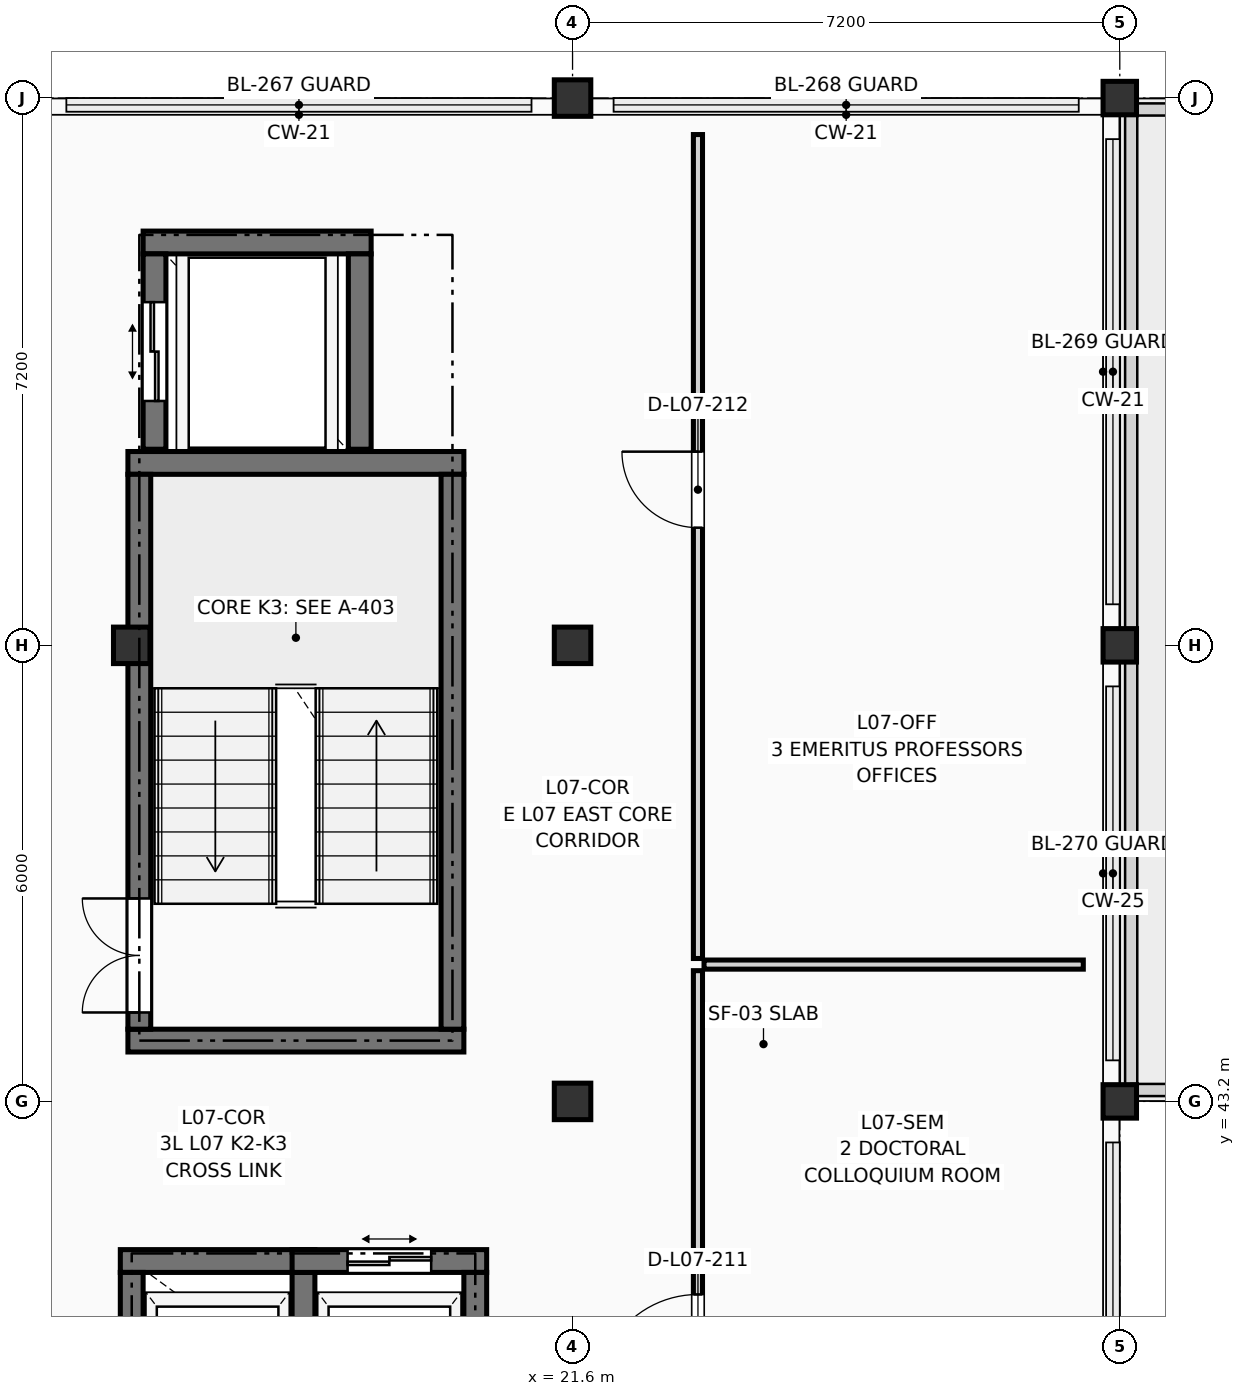
"""IFC4 building model, lengths in metres.
Left out: names, types, materials, properties, quantities, classifications, styles, units other than length and angle.
Written with IfcOpenShell. Run it as: python <this file> out.ifc"""

import sys

from ifc_helpers import new_model, si_unit, direction, frame, frame_2d, origin, origin_2d, place, context, subcontext, project, spatial, rectangle, extrude, element, fill, save


model = new_model("IFC4")
c1 = context("Model", 3, precision=1e-05, world=origin(), true_north=direction((0.0, 1.0)))
c2 = subcontext(c1, "Body", "Model", "MODEL_VIEW")
j1 = project(units=[si_unit("LENGTHUNIT", "METRE"), si_unit("PLANEANGLEUNIT", "RADIAN")], contexts=[c1])
p1 = place(None, origin())
s1 = spatial("IfcSite", under=j1, at=p1, CompositionType="ELEMENT")
p2 = place(p1, origin())
s2 = spatial("IfcBuilding", under=s1, at=p2, CompositionType="ELEMENT")
p3 = place(p2, frame((0.0, 0.0, 26.25)))
s3 = spatial("IfcBuildingStorey", under=s2, at=p3, CompositionType="ELEMENT", Elevation=26.25)
for number, where, z_axis, x_axis in (
    (1, (15.8, 49.2, 0.0), (0.0, 0.0, 1.0), (1.0, 0.0, 0.0)),
    (2, (21.6, 43.2, 0.0), (0.0, 0.0, 1.0), (1.0, 0.0, 0.0)),
    (3, (21.6, 49.2, 0.0), (0.0, 0.0, 1.0), (1.0, 0.0, 0.0)),
    (4, (21.6, 56.4, 0.0), (0.0, 0.0, 1.0), (1.0, 0.0, 0.0)),
):
    element("IfcColumn", number, at=place(p3, frame(where, z_axis=z_axis, x_axis=x_axis)), inside=s3, PredefinedType="COLUMN", context=c2, shape_type="SweptSolid", body=[
        extrude(rectangle(XDim=0.48, YDim=0.48, at=origin_2d()), origin(), (0.0, 0.0, 1.0), 3.45),
    ])
for number, where, z_axis, x_axis in (
    (5, (28.8, 43.2, 0.0), (0.0, 0.0, 1.0), (1.0, 0.0, 0.0)),
    (6, (28.8, 49.2, 0.0), (0.0, 0.0, 1.0), (1.0, 0.0, 0.0)),
    (7, (28.8, 56.4, 0.0), (0.0, 0.0, 1.0), (1.0, 0.0, 0.0)),
):
    element("IfcColumn", number, at=place(p3, frame(where, z_axis=z_axis, x_axis=x_axis)), inside=s3, PredefinedType="COLUMN", context=c2, shape_type="SweptSolid", body=[
        extrude(rectangle(XDim=0.44, YDim=0.44, at=origin_2d()), origin(), (0.0, 0.0, 1.0), 3.45),
    ])
p4 = place(p3, frame((39.45, 56.25, 0.1), z_axis=(0.0, 0.0, 1.0), x_axis=(-1.0, 0.0, 0.0)))
e8 = element("IfcWall", 8, at=p4, inside=s3, PredefinedType="PARAPET", context=c2, shape_type="SweptSolid", body=[
    extrude(rectangle(XDim=10.5, YDim=0.16, at=frame_2d((5.25, 0.0))), origin(), (0.0, 0.0, 1.0), 1.0),
])
p5 = place(p3, frame((28.95, 56.25, 0.1), z_axis=(0.0, 0.0, 1.0), x_axis=(0.0, -1.0, 0.0)))
e9 = element("IfcWall", 9, at=p5, inside=s3, PredefinedType="PARAPET", context=c2, shape_type="SweptSolid", body=[
    extrude(rectangle(XDim=12.9, YDim=0.16, at=frame_2d((6.45, 0.0))), origin(), (0.0, 0.0, 1.0), 1.0),
])
p6 = place(p3, frame((28.95, 43.35, 0.1), z_axis=(0.0, 0.0, 1.0), x_axis=(1.0, 0.0, 0.0)))
e10 = element("IfcWall", 10, at=p6, inside=s3, PredefinedType="PARAPET", context=c2, shape_type="SweptSolid", body=[
    extrude(rectangle(XDim=10.5, YDim=0.16, at=frame_2d((5.25, 0.0))), origin(), (0.0, 0.0, 1.0), 1.0),
])
for number, where, z_axis, x_axis in (
    (11, (15.75, 44.0, 0.0), (0.0, 0.0, 1.0), (1.0, 0.0, 0.0)),
    (12, (15.75, 51.6, 0.0), (0.0, 0.0, 1.0), (1.0, 0.0, 0.0)),
):
    element("IfcWall", number, at=place(p3, frame(where, z_axis=z_axis, x_axis=x_axis)), inside=s3, PredefinedType="SHEAR", context=c2, shape_type="SweptSolid", body=[
        extrude(rectangle(XDim=4.42, YDim=0.3, at=frame_2d((2.21, 0.0))), origin(), (0.0, 0.0, 1.0), 3.24),
    ])
p7 = place(p3, frame((15.9, 44.15, 0.0), z_axis=(0.0, 0.0, 1.0), x_axis=(0.0, 1.0, 0.0)))
e13 = element("IfcWall", 13, at=p7, inside=s3, PredefinedType="SHEAR", context=c2, shape_type="SweptSolid", body=[
    extrude(rectangle(XDim=7.3, YDim=0.3, at=frame_2d((3.65, 0.0))), origin(), (0.0, 0.0, 1.0), 3.24),
])
p8 = place(p7, frame((0.22, 0.0, 0.0)))
e14 = element("IfcOpeningElement", 14, at=p8, cuts=e13, PredefinedType="OPENING", context=c2, shape_type="SweptSolid", body=[
    extrude(rectangle(XDim=1.5, YDim=2.2, at=frame_2d((0.75, 1.1))), frame((0.0, 0.162, 0.0), z_axis=(0.0, -1.0, 0.0), x_axis=(1.0, 0.0, 0.0)), (0.0, 0.0, 1.0), 0.324),
])
p9 = place(p3, frame((20.02, 44.15, 0.0), z_axis=(0.0, 0.0, 1.0), x_axis=(0.0, 1.0, 0.0)))
e15 = element("IfcWall", 15, at=p9, inside=s3, PredefinedType="SHEAR", context=c2, shape_type="SweptSolid", body=[
    extrude(rectangle(XDim=7.3, YDim=0.3, at=frame_2d((3.65, 0.0))), origin(), (0.0, 0.0, 1.0), 3.24),
])
p10 = place(p3, frame((15.65, 41.1, 0.0), z_axis=(0.0, 0.0, 1.0), x_axis=(1.0, 0.0, 0.0)))
e16 = element("IfcWall", 16, at=p10, inside=s3, PredefinedType="SHEAR", context=c2, shape_type="SweptSolid", body=[
    extrude(rectangle(XDim=2.56, YDim=0.3, at=frame_2d((1.28, 0.0))), origin(), (0.0, 0.0, 1.0), 3.24),
])
p11 = place(p3, frame((15.8, 37.98, 0.0), z_axis=(0.0, 0.0, 1.0), x_axis=(0.0, 1.0, 0.0)))
e17 = element("IfcWall", 17, at=p11, inside=s3, PredefinedType="SHEAR", context=c2, shape_type="SweptSolid", body=[
    extrude(rectangle(XDim=2.97, YDim=0.3, at=frame_2d((1.485, 0.0))), origin(), (0.0, 0.0, 1.0), 3.24),
])
p12 = place(p11, frame((0.935, 0.0, 0.0)))
e18 = element("IfcOpeningElement", 18, at=p12, cuts=e17, PredefinedType="OPENING", context=c2, shape_type="SweptSolid", body=[
    extrude(rectangle(XDim=1.1, YDim=2.2, at=frame_2d((0.55, 1.1))), frame((0.0, 0.162, 0.0), z_axis=(0.0, -1.0, 0.0), x_axis=(1.0, 0.0, 0.0)), (0.0, 0.0, 1.0), 0.324),
])
p13 = place(p3, frame((18.06, 37.98, 0.0), z_axis=(0.0, 0.0, 1.0), x_axis=(0.0, 1.0, 0.0)))
e19 = element("IfcWall", 19, at=p13, inside=s3, PredefinedType="SHEAR", context=c2, shape_type="SweptSolid", body=[
    extrude(rectangle(XDim=2.97, YDim=0.3, at=frame_2d((1.485, 0.0))), origin(), (0.0, 0.0, 1.0), 3.24),
])
p14 = place(p3, frame((17.91, 41.1, 0.0), z_axis=(0.0, 0.0, 1.0), x_axis=(1.0, 0.0, 0.0)))
e20 = element("IfcWall", 20, at=p14, inside=s3, PredefinedType="SHEAR", context=c2, shape_type="SweptSolid", body=[
    extrude(rectangle(XDim=2.56, YDim=0.3, at=frame_2d((1.28, 0.0))), origin(), (0.0, 0.0, 1.0), 3.24),
])
p15 = place(p14, frame((0.73, 0.0, 0.0)))
e21 = element("IfcOpeningElement", 21, at=p15, cuts=e20, PredefinedType="OPENING", context=c2, shape_type="SweptSolid", body=[
    extrude(rectangle(XDim=1.1, YDim=2.2, at=frame_2d((0.55, 1.1))), frame((0.0, 0.162, 0.0), z_axis=(0.0, -1.0, 0.0), x_axis=(1.0, 0.0, 0.0)), (0.0, 0.0, 1.0), 0.324),
])
p16 = place(p3, frame((20.32, 37.98, 0.0), z_axis=(0.0, 0.0, 1.0), x_axis=(0.0, 1.0, 0.0)))
e22 = element("IfcWall", 22, at=p16, inside=s3, PredefinedType="SHEAR", context=c2, shape_type="SweptSolid", body=[
    extrude(rectangle(XDim=2.97, YDim=0.3, at=frame_2d((1.485, 0.0))), origin(), (0.0, 0.0, 1.0), 3.24),
])
p17 = place(p3, frame((15.95, 54.5, 0.0), z_axis=(0.0, 0.0, 1.0), x_axis=(1.0, 0.0, 0.0)))
e23 = element("IfcWall", 23, at=p17, inside=s3, PredefinedType="SHEAR", context=c2, shape_type="SweptSolid", body=[
    extrude(rectangle(XDim=3.0, YDim=0.3, at=frame_2d((1.5, 0.0))), origin(), (0.0, 0.0, 1.0), 3.24),
])
p18 = place(p3, frame((16.1, 51.78, 0.0), z_axis=(0.0, 0.0, 1.0), x_axis=(0.0, 1.0, 0.0)))
e24 = element("IfcWall", 24, at=p18, inside=s3, PredefinedType="SHEAR", context=c2, shape_type="SweptSolid", body=[
    extrude(rectangle(XDim=2.57, YDim=0.3, at=frame_2d((1.285, 0.0))), origin(), (0.0, 0.0, 1.0), 3.24),
])
p19 = place(p18, frame((0.635, 0.0, 0.0)))
e25 = element("IfcOpeningElement", 25, at=p19, cuts=e24, PredefinedType="OPENING", context=c2, shape_type="SweptSolid", body=[
    extrude(rectangle(XDim=1.3, YDim=2.25, at=frame_2d((0.65, 1.125))), frame((0.0, 0.162, 0.0), z_axis=(0.0, -1.0, 0.0), x_axis=(1.0, 0.0, 0.0)), (0.0, 0.0, 1.0), 0.324),
])
p20 = place(p3, frame((18.8, 51.78, 0.0), z_axis=(0.0, 0.0, 1.0), x_axis=(0.0, 1.0, 0.0)))
e26 = element("IfcWall", 26, at=p20, inside=s3, PredefinedType="SHEAR", context=c2, shape_type="SweptSolid", body=[
    extrude(rectangle(XDim=2.57, YDim=0.3, at=frame_2d((1.285, 0.0))), origin(), (0.0, 0.0, 1.0), 3.24),
])
p21 = place(p3, frame((23.25, 35.08, 0.0), z_axis=(0.0, 0.0, 1.0), x_axis=(0.0, 1.0, 0.0)))
e27 = element("IfcWall", 27, at=p21, inside=s3, PredefinedType="PARTITIONING", context=c2, shape_type="SweptSolid", body=[
    extrude(rectangle(XDim=9.84, YDim=0.12, at=frame_2d((4.92, 0.0))), origin(), (0.0, 0.0, 1.0), 3.225),
])
p22 = place(p21, frame((4.26, 0.0, 0.0)))
e28 = element("IfcOpeningElement", 28, at=p22, cuts=e27, PredefinedType="OPENING", context=c2, shape_type="SweptSolid", body=[
    extrude(rectangle(XDim=1.32, YDim=2.2, at=frame_2d((0.66, 1.1))), frame((0.0, 0.072, 0.0), z_axis=(0.0, -1.0, 0.0), x_axis=(1.0, 0.0, 0.0)), (0.0, 0.0, 1.0), 0.144),
])
p23 = place(p3, frame((23.33, 45.0, 0.0), z_axis=(0.0, 0.0, 1.0), x_axis=(1.0, 0.0, 0.0)))
e29 = element("IfcWall", 29, at=p23, inside=s3, PredefinedType="PARTITIONING", context=c2, shape_type="SweptSolid", body=[
    extrude(rectangle(XDim=4.99, YDim=0.12, at=frame_2d((2.495, 0.0))), origin(), (0.0, 0.0, 1.0), 3.225),
])
p24 = place(p3, frame((23.25, 45.08, 0.0), z_axis=(0.0, 0.0, 1.0), x_axis=(0.0, 1.0, 0.0)))
e30 = element("IfcWall", 30, at=p24, inside=s3, PredefinedType="PARTITIONING", context=c2, shape_type="SweptSolid", body=[
    extrude(rectangle(XDim=10.84, YDim=0.12, at=frame_2d((5.42, 0.0))), origin(), (0.0, 0.0, 1.0), 3.225),
])
p25 = place(p24, frame((5.668, 0.0, 0.0)))
e31 = element("IfcOpeningElement", 31, at=p25, cuts=e30, PredefinedType="OPENING", context=c2, shape_type="SweptSolid", body=[
    extrude(rectangle(XDim=1.0, YDim=2.15, at=frame_2d((0.5, 1.075))), frame((0.0, 0.072, 0.0), z_axis=(0.0, -1.0, 0.0), x_axis=(1.0, 0.0, 0.0)), (0.0, 0.0, 1.0), 0.144),
])
p26 = place(p8, origin())
e32 = element("IfcDoor", 32, at=p26, inside=s3, OperationType="DOUBLE_DOOR_SINGLE_SWING", PredefinedType="DOOR", context=c2, shape_type="SweptSolid", body=[
    extrude(rectangle(XDim=1.5, YDim=2.2, at=frame_2d((0.75, 1.1))), frame((0.0, 0.025, 0.0), z_axis=(0.0, -1.0, 0.0), x_axis=(1.0, 0.0, 0.0)), (0.0, 0.0, 1.0), 0.05),
])
fill(e14, e32)
p27 = place(p15, origin())
e33 = element("IfcDoor", 33, at=p27, inside=s3, OperationType="DOUBLE_DOOR_SLIDING", PredefinedType="DOOR", context=c2, shape_type="SweptSolid", body=[
    extrude(rectangle(XDim=1.1, YDim=2.2, at=frame_2d((0.55, 1.1))), frame((0.0, 0.025, 0.0), z_axis=(0.0, -1.0, 0.0), x_axis=(1.0, 0.0, 0.0)), (0.0, 0.0, 1.0), 0.05),
])
fill(e21, e33)
p28 = place(p19, origin())
e34 = element("IfcDoor", 34, at=p28, inside=s3, OperationType="DOUBLE_DOOR_SLIDING", PredefinedType="DOOR", context=c2, shape_type="SweptSolid", body=[
    extrude(rectangle(XDim=1.3, YDim=2.25, at=frame_2d((0.65, 1.125))), frame((0.0, 0.025, 0.0), z_axis=(0.0, -1.0, 0.0), x_axis=(1.0, 0.0, 0.0)), (0.0, 0.0, 1.0), 0.05),
])
fill(e25, e34)
p29 = place(p22, origin())
e35 = element("IfcDoor", 35, at=p29, inside=s3, OperationType="SINGLE_SWING_LEFT", PredefinedType="DOOR", context=c2, shape_type="SweptSolid", body=[
    extrude(rectangle(XDim=1.32, YDim=2.2, at=frame_2d((0.66, 1.1))), frame((0.0, 0.025, 0.0), z_axis=(0.0, -1.0, 0.0), x_axis=(1.0, 0.0, 0.0)), (0.0, 0.0, 1.0), 0.05),
])
fill(e28, e35)
p30 = place(p25, origin())
e36 = element("IfcDoor", 36, at=p30, inside=s3, OperationType="SINGLE_SWING_RIGHT", PredefinedType="DOOR", context=c2, shape_type="SweptSolid", body=[
    extrude(rectangle(XDim=1.0, YDim=2.15, at=frame_2d((0.5, 1.075))), frame((0.0, 0.025, 0.0), z_axis=(0.0, -1.0, 0.0), x_axis=(1.0, 0.0, 0.0)), (0.0, 0.0, 1.0), 0.05),
])
fill(e31, e36)
save(model, sys.argv[1])
